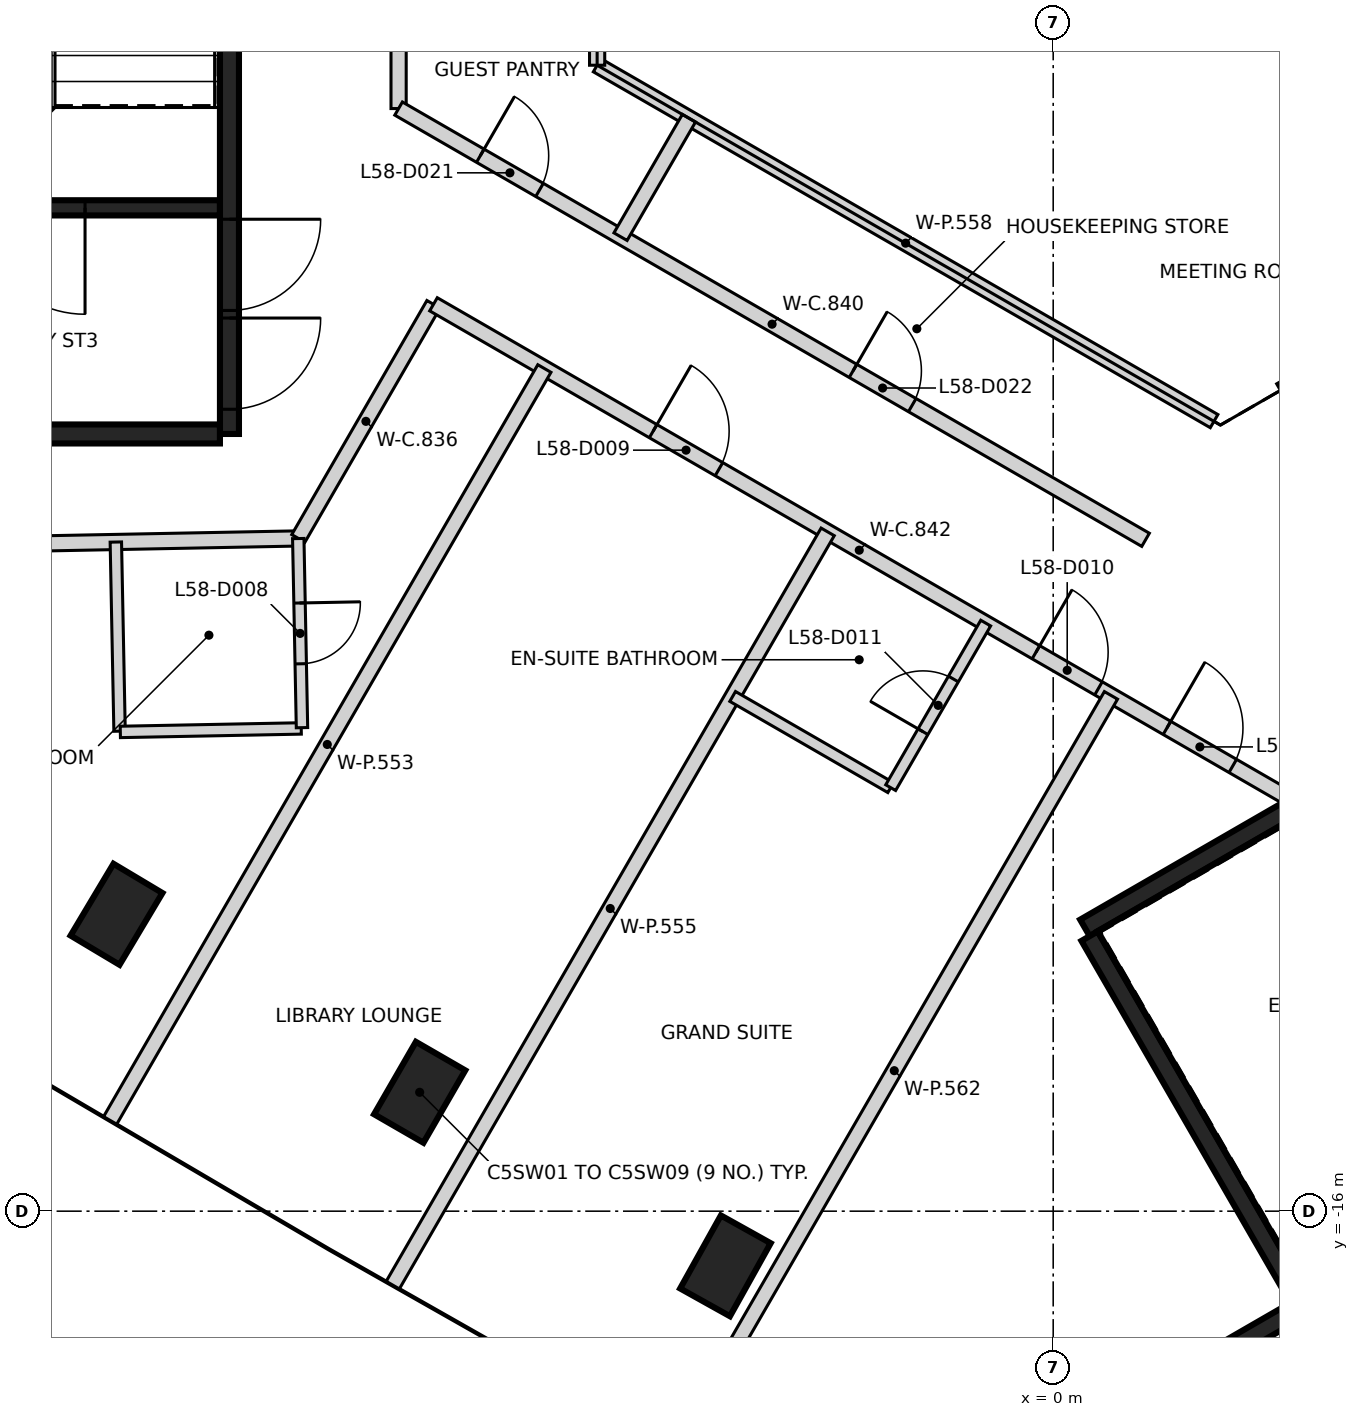
"""IFC4 building model, lengths in metres.
Left out: names, types, materials, properties, quantities, classifications, styles, units other than length and angle.
Written with IfcOpenShell. Run it as: python <this file> out.ifc"""

import sys

from ifc_helpers import new_model, si_unit, direction, frame, frame_2d, origin, origin_2d, place, context, subcontext, project, spatial, rectangle, extrude, element, fill, save


model = new_model("IFC4")
c1 = context("Model", 3, precision=1e-05, world=origin(), true_north=direction((0.0, 1.0)))
c2 = subcontext(c1, "Body", "Model", "MODEL_VIEW")
j1 = project(units=[si_unit("LENGTHUNIT", "METRE"), si_unit("PLANEANGLEUNIT", "RADIAN")], contexts=[c1])
p1 = place(None, origin())
s1 = spatial("IfcSite", under=j1, at=p1, CompositionType="ELEMENT")
p2 = place(p1, origin())
s2 = spatial("IfcBuilding", under=s1, at=p2, CompositionType="ELEMENT")
p3 = place(p2, frame((0.0, 0.0, 232.2)))
s3 = spatial("IfcBuildingStorey", under=s2, at=p3, CompositionType="ELEMENT", Elevation=232.2)
for number, where, z_axis, x_axis in (
    (1, (-12.323, -12.094, -0.35), (0.0, 0.0, 1.0), (0.513, 0.858, 0.0)),
    (2, (-8.335, -14.436, -0.35), (0.0, 0.0, 1.0), (0.5, 0.866, 0.0)),
    (3, (-4.312, -16.719, -0.35), (0.0, 0.0, 1.0), (0.487, 0.873, 0.0)),
):
    element("IfcColumn", number, at=place(p3, frame(where, z_axis=z_axis, x_axis=x_axis)), inside=s3, PredefinedType="COLUMN", context=c2, shape_type="SweptSolid", body=[
        extrude(rectangle(XDim=1.1, YDim=0.75, at=origin_2d()), origin(), (0.0, 0.0, 1.0), 3.6),
    ])
p4 = place(p3, frame((-10.837, 5.775, 0.0), z_axis=(0.0, 0.0, 1.0), x_axis=(0.0, -1.0, 0.0)))
e4 = element("IfcWall", 4, at=p4, inside=s3, PredefinedType="SHEAR", context=c2, shape_type="SweptSolid", body=[
    extrude(rectangle(XDim=11.55, YDim=0.25, at=frame_2d((5.775, 0.0))), origin(), (0.0, 0.0, 1.0), 3.25),
])
p5 = place(p4, frame((10.025, 0.0, 0.0)))
e5 = element("IfcOpeningElement", 5, at=p5, cuts=e4, PredefinedType="OPENING", context=c2, shape_type="SweptSolid", body=[
    extrude(rectangle(XDim=1.2, YDim=2.1, at=frame_2d((0.6, 1.05))), frame((0.0, 0.135, 0.0), z_axis=(0.0, -1.0, 0.0), x_axis=(1.0, 0.0, 0.0)), (0.0, 0.0, 1.0), 0.27),
])
p6 = place(p4, frame((8.725, 0.0, 0.0)))
e6 = element("IfcOpeningElement", 6, at=p6, cuts=e4, PredefinedType="OPENING", context=c2, shape_type="SweptSolid", body=[
    extrude(rectangle(XDim=1.2, YDim=2.1, at=frame_2d((0.6, 1.05))), frame((0.0, 0.135, 0.0), z_axis=(0.0, -1.0, 0.0), x_axis=(1.0, 0.0, 0.0)), (0.0, 0.0, 1.0), 0.27),
])
p7 = place(p3, frame((-10.963, -5.775, 0.0), z_axis=(0.0, 0.0, 1.0), x_axis=(-1.0, 0.0, 0.0)))
e7 = element("IfcWall", 7, at=p7, inside=s3, PredefinedType="SHEAR", context=c2, shape_type="SweptSolid", body=[
    extrude(rectangle(XDim=5.225, YDim=0.25, at=frame_2d((2.612, 0.0))), origin(), (0.0, 0.0, 1.0), 3.25),
])
p8 = place(p3, frame((-10.963, -2.8, 0.0), z_axis=(0.0, 0.0, 1.0), x_axis=(-1.0, 0.0, 0.0)))
e8 = element("IfcWall", 8, at=p8, inside=s3, PredefinedType="SHEAR", context=c2, shape_type="SweptSolid", body=[
    extrude(rectangle(XDim=5.098, YDim=0.2, at=frame_2d((2.549, 0.0))), origin(), (0.0, 0.0, 1.0), 3.25),
])
p9 = place(p8, frame((1.774, 0.0, 0.0)))
e9 = element("IfcOpeningElement", 9, at=p9, cuts=e8, PredefinedType="OPENING", context=c2, shape_type="SweptSolid", body=[
    extrude(rectangle(XDim=1.4, YDim=2.1, at=frame_2d((0.7, 1.05))), frame((0.0, 0.11, 0.0), z_axis=(0.0, -1.0, 0.0), x_axis=(1.0, 0.0, 0.0)), (0.0, 0.0, 1.0), 0.22),
])
p10 = place(p3, frame((0.417, -12.273, 0.0), z_axis=(0.0, 0.0, 1.0), x_axis=(0.866021906294, 0.500006057782, 0.0)))
e10 = element("IfcWall", 10, at=p10, inside=s3, PredefinedType="SHEAR", context=c2, shape_type="SweptSolid", body=[
    extrude(rectangle(XDim=11.55, YDim=0.25, at=frame_2d((5.775, 0.0))), origin(), (0.0, 0.0, 1.0), 3.25),
])
p11 = place(p10, frame((10.025, 0.0, 0.0)))
e11 = element("IfcOpeningElement", 11, at=p11, cuts=e10, PredefinedType="OPENING", context=c2, shape_type="SweptSolid", body=[
    extrude(rectangle(XDim=1.2, YDim=2.1, at=frame_2d((0.6, 1.05))), frame((0.0, 0.135, 0.0), z_axis=(0.0, -1.0, 0.0), x_axis=(1.0, 0.0, 0.0)), (0.0, 0.0, 1.0), 0.27),
])
p12 = place(p10, frame((8.725, 0.0, 0.0)))
e12 = element("IfcOpeningElement", 12, at=p12, cuts=e10, PredefinedType="OPENING", context=c2, shape_type="SweptSolid", body=[
    extrude(rectangle(XDim=1.2, YDim=2.1, at=frame_2d((0.6, 1.05))), frame((0.0, 0.135, 0.0), z_axis=(0.0, -1.0, 0.0), x_axis=(1.0, 0.0, 0.0)), (0.0, 0.0, 1.0), 0.27),
])
p13 = place(p3, frame((3.235, -17.153, 0.0), z_axis=(0.0, 0.0, 1.0), x_axis=(-0.500008851346, 0.866020293397, 0.0)))
e13 = element("IfcWall", 13, at=p13, inside=s3, PredefinedType="SHEAR", context=c2, shape_type="SweptSolid", body=[
    extrude(rectangle(XDim=5.51, YDim=0.25, at=frame_2d((2.755, 0.0))), origin(), (0.0, 0.0, 1.0), 3.25),
])
p14 = place(p3, frame((1.669, -18.19, 0.0), z_axis=(0.0, 0.0, 1.0), x_axis=(0.866042235819, 0.499970844928, 0.0)))
e14 = element("IfcWall", 14, at=p14, inside=s3, PredefinedType="SHEAR", context=c2, shape_type="SweptSolid", body=[
    extrude(rectangle(XDim=2.865, YDim=0.25, at=frame_2d((1.432, 0.0))), origin(), (0.0, 0.0, 1.0), 3.25),
])
p15 = place(p3, frame((-19.149, -7.329, 0.0), z_axis=(0.0, 0.0, 1.0), x_axis=(0.999810023919, 0.019491435849, 0.0)))
e15 = element("IfcWall", 15, at=p15, inside=s3, PredefinedType="PARTITIONING", context=c2, shape_type="SweptSolid", body=[
    extrude(rectangle(XDim=9.219, YDim=0.2, at=frame_2d((4.609, 0.0))), origin(), (0.0, 0.0, 1.0), 3.25),
])
p16 = place(p15, frame((3.23, 0.0, 0.0)))
e16 = element("IfcOpeningElement", 16, at=p16, cuts=e15, PredefinedType="OPENING", context=c2, shape_type="SweptSolid", body=[
    extrude(rectangle(XDim=0.95, YDim=2.1, at=frame_2d((0.475, 1.05))), frame((0.0, 0.11, 0.0), z_axis=(0.0, -1.0, 0.0), x_axis=(1.0, 0.0, 0.0)), (0.0, 0.0, 1.0), 0.22),
])
p17 = place(p3, frame((-9.931, -7.149, 0.0), z_axis=(0.0, 0.0, 1.0), x_axis=(0.499934418432, 0.86606326401, 0.0)))
e17 = element("IfcWall", 17, at=p17, inside=s3, PredefinedType="PARTITIONING", context=c2, shape_type="SweptSolid", body=[
    extrude(rectangle(XDim=3.556, YDim=0.2, at=frame_2d((1.778, 0.0))), origin(), (0.0, 0.0, 1.0), 3.25),
])
p18 = place(p3, frame((-8.612, -1.494, 0.0), z_axis=(0.0, 0.0, 1.0), x_axis=(0.0, 1.0, 0.0)))
e18 = element("IfcWall", 18, at=p18, inside=s3, PredefinedType="PARTITIONING", context=c2, shape_type="SweptSolid", body=[
    extrude(rectangle(XDim=1.383, YDim=0.2, at=frame_2d((0.691, 0.0))), origin(), (0.0, 0.0, 1.0), 3.25),
])
p19 = place(p3, frame((-8.612, -1.494, 0.0), z_axis=(0.0, 0.0, 1.0), x_axis=(0.866035468681, -0.499982566683, 0.0)))
e19 = element("IfcWall", 19, at=p19, inside=s3, PredefinedType="PARTITIONING", context=c2, shape_type="SweptSolid", body=[
    extrude(rectangle(XDim=11.348, YDim=0.2, at=frame_2d((5.674, 0.0))), origin(), (0.0, 0.0, 1.0), 3.25),
])
p20 = place(p19, frame((1.241, 0.0, 0.0)))
e20 = element("IfcOpeningElement", 20, at=p20, cuts=e19, PredefinedType="OPENING", context=c2, shape_type="SweptSolid", body=[
    extrude(rectangle(XDim=0.9, YDim=2.1, at=frame_2d((0.45, 1.05))), frame((0.0, 0.11, 0.0), z_axis=(0.0, -1.0, 0.0), x_axis=(1.0, 0.0, 0.0)), (0.0, 0.0, 1.0), 0.22),
])
p21 = place(p19, frame((6.903, 0.0, 0.0)))
e21 = element("IfcOpeningElement", 21, at=p21, cuts=e19, PredefinedType="OPENING", context=c2, shape_type="SweptSolid", body=[
    extrude(rectangle(XDim=0.9, YDim=2.1, at=frame_2d((0.45, 1.05))), frame((0.0, 0.11, 0.0), z_axis=(0.0, -1.0, 0.0), x_axis=(1.0, 0.0, 0.0)), (0.0, 0.0, 1.0), 0.22),
])
p22 = place(p3, frame((-8.153, -4.069, 0.0), z_axis=(0.0, 0.0, 1.0), x_axis=(0.865955522833, -0.500121017829, 0.0)))
e22 = element("IfcWall", 22, at=p22, inside=s3, PredefinedType="PARTITIONING", context=c2, shape_type="SweptSolid", body=[
    extrude(rectangle(XDim=12.937, YDim=0.2, at=frame_2d((6.469, 0.0))), origin(), (0.0, 0.0, 1.0), 3.25),
])
p23 = place(p22, frame((3.337, 0.0, 0.0)))
e23 = element("IfcOpeningElement", 23, at=p23, cuts=e22, PredefinedType="OPENING", context=c2, shape_type="SweptSolid", body=[
    extrude(rectangle(XDim=1.0, YDim=2.1, at=frame_2d((0.5, 1.05))), frame((0.0, 0.11, 0.0), z_axis=(0.0, -1.0, 0.0), x_axis=(1.0, 0.0, 0.0)), (0.0, 0.0, 1.0), 0.22),
])
p24 = place(p22, frame((9.153, 0.0, 0.0)))
e24 = element("IfcOpeningElement", 24, at=p24, cuts=e22, PredefinedType="OPENING", context=c2, shape_type="SweptSolid", body=[
    extrude(rectangle(XDim=0.95, YDim=2.1, at=frame_2d((0.475, 1.05))), frame((0.0, 0.11, 0.0), z_axis=(0.0, -1.0, 0.0), x_axis=(1.0, 0.0, 0.0)), (0.0, 0.0, 1.0), 0.22),
])
p25 = place(p22, frame((11.144, 0.0, 0.0)))
e25 = element("IfcOpeningElement", 25, at=p25, cuts=e22, PredefinedType="OPENING", context=c2, shape_type="SweptSolid", body=[
    extrude(rectangle(XDim=1.0, YDim=2.1, at=frame_2d((0.5, 1.05))), frame((0.0, 0.11, 0.0), z_axis=(0.0, -1.0, 0.0), x_axis=(1.0, 0.0, 0.0)), (0.0, 0.0, 1.0), 0.22),
])
p26 = place(p3, frame((-12.407, -14.806, 0.0), z_axis=(0.0, 0.0, 1.0), x_axis=(0.500104175471, 0.865965249693, 0.0)))
e26 = element("IfcWall", 26, at=p26, inside=s3, PredefinedType="PARTITIONING", context=c2, shape_type="SweptSolid", body=[
    extrude(rectangle(XDim=11.423, YDim=0.2, at=frame_2d((5.711, 0.0))), origin(), (0.0, 0.0, 1.0), 2.35),
])
p27 = place(p3, frame((-8.688, -16.973, 0.0), z_axis=(0.0, 0.0, 1.0), x_axis=(0.500021643343, 0.866012907634, 0.0)))
e27 = element("IfcWall", 27, at=p27, inside=s3, PredefinedType="PARTITIONING", context=c2, shape_type="SweptSolid", body=[
    extrude(rectangle(XDim=11.443, YDim=0.2, at=frame_2d((5.721, 0.0))), origin(), (0.0, 0.0, 1.0), 2.35),
])
p28 = place(p3, frame((-6.0, -0.924, 0.0), z_axis=(0.0, 0.0, 1.0), x_axis=(0.866223755075, -0.499656288007, 0.0)))
e28 = element("IfcWall", 28, at=p28, inside=s3, PredefinedType="PARTITIONING", context=c2, shape_type="SweptSolid", body=[
    extrude(rectangle(XDim=9.37, YDim=0.2, at=frame_2d((4.685, 0.0))), origin(), (0.0, 0.0, 1.0), 3.25),
])
p29 = place(p3, frame((-6.0, -0.924, 0.0), z_axis=(0.0, 0.0, 1.0), x_axis=(0.0, 1.0, 0.0)))
e29 = element("IfcWall", 29, at=p29, inside=s3, PredefinedType="PARTITIONING", context=c2, shape_type="SweptSolid", body=[
    extrude(rectangle(XDim=1.848, YDim=0.2, at=frame_2d((0.924, 0.0))), origin(), (0.0, 0.0, 1.0), 3.25),
])
p30 = place(p3, frame((-5.692, -3.179, 0.0), z_axis=(0.0, 0.0, 1.0), x_axis=(0.500164619231, 0.865930339964, 0.0)))
e30 = element("IfcWall", 30, at=p30, inside=s3, PredefinedType="PARTITIONING", context=c2, shape_type="SweptSolid", body=[
    extrude(rectangle(XDim=1.8, YDim=0.2, at=frame_2d((0.9, 0.0))), origin(), (0.0, 0.0, 1.0), 3.25),
])
p31 = place(p3, frame((-4.942, -19.089, 0.0), z_axis=(0.0, 0.0, 1.0), x_axis=(0.500021458202, 0.866013014531, 0.0)))
e31 = element("IfcWall", 31, at=p31, inside=s3, PredefinedType="PARTITIONING", context=c2, shape_type="SweptSolid", body=[
    extrude(rectangle(XDim=11.403, YDim=0.2, at=frame_2d((5.701, 0.0))), origin(), (0.0, 0.0, 1.0), 2.35),
])
p32 = place(p3, frame((2.99, -5.202, 0.0), z_axis=(0.0, 0.0, 1.0), x_axis=(0.865872609263, 0.500264554538, 0.0)))
e32 = element("IfcWall", 32, at=p32, inside=s3, PredefinedType="PARTITIONING", context=c2, shape_type="SweptSolid", body=[
    extrude(rectangle(XDim=0.936, YDim=0.2, at=frame_2d((0.468, 0.0))), origin(), (0.0, 0.0, 1.0), 3.25),
])
p33 = place(p3, frame((-12.332, -7.197, 0.0), z_axis=(0.0, 0.0, 1.0), x_axis=(0.019719450113, -0.999805552739, 0.0)))
e33 = element("IfcWall", 33, at=p33, inside=s3, PredefinedType="PARTITIONING", context=c2, shape_type="SweptSolid", body=[
    extrude(rectangle(XDim=2.489, YDim=0.15, at=frame_2d((1.244, 0.0))), origin(), (0.0, 0.0, 1.0), 3.25),
])
p34 = place(p3, frame((-12.273, -9.695, 0.0), z_axis=(0.0, 0.0, 1.0), x_axis=(0.999812094216, 0.019384949303, 0.0)))
e34 = element("IfcWall", 34, at=p34, inside=s3, PredefinedType="PARTITIONING", context=c2, shape_type="SweptSolid", body=[
    extrude(rectangle(XDim=2.38, YDim=0.15, at=frame_2d((1.19, 0.0))), origin(), (0.0, 0.0, 1.0), 3.25),
])
p35 = place(p3, frame((-9.932, -7.151, 0.0), z_axis=(0.0, 0.0, 1.0), x_axis=(0.019621381261, -0.999807482167, 0.0)))
e35 = element("IfcWall", 35, at=p35, inside=s3, PredefinedType="PARTITIONING", context=c2, shape_type="SweptSolid", body=[
    extrude(rectangle(XDim=2.489, YDim=0.15, at=frame_2d((1.244, 0.0))), origin(), (0.0, 0.0, 1.0), 3.25),
])
p36 = place(p35, frame((0.848, 0.0, 0.0)))
e36 = element("IfcOpeningElement", 36, at=p36, cuts=e35, PredefinedType="OPENING", context=c2, shape_type="SweptSolid", body=[
    extrude(rectangle(XDim=0.8, YDim=2.1, at=frame_2d((0.4, 1.05))), frame((0.0, 0.085, 0.0), z_axis=(0.0, -1.0, 0.0), x_axis=(1.0, 0.0, 0.0)), (0.0, 0.0, 1.0), 0.17),
])
p37 = place(p3, frame((-4.217, -9.228, 0.0), z_axis=(0.0, 0.0, 1.0), x_axis=(0.866100915363, -0.499869187296, 0.0)))
e37 = element("IfcWall", 37, at=p37, inside=s3, PredefinedType="PARTITIONING", context=c2, shape_type="SweptSolid", body=[
    extrude(rectangle(XDim=2.401, YDim=0.15, at=frame_2d((1.2, 0.0))), origin(), (0.0, 0.0, 1.0), 3.25),
])
p38 = place(p3, frame((-2.138, -10.428, 0.0), z_axis=(0.0, 0.0, 1.0), x_axis=(0.500004234368, 0.866022959057, 0.0)))
e38 = element("IfcWall", 38, at=p38, inside=s3, PredefinedType="PARTITIONING", context=c2, shape_type="SweptSolid", body=[
    extrude(rectangle(XDim=2.5, YDim=0.15, at=frame_2d((1.25, 0.0))), origin(), (0.0, 0.0, 1.0), 3.25),
])
p39 = place(p38, frame((0.85, 0.0, 0.0)))
e39 = element("IfcOpeningElement", 39, at=p39, cuts=e38, PredefinedType="OPENING", context=c2, shape_type="SweptSolid", body=[
    extrude(rectangle(XDim=0.8, YDim=2.1, at=frame_2d((0.4, 1.05))), frame((0.0, 0.085, 0.0), z_axis=(0.0, -1.0, 0.0), x_axis=(1.0, 0.0, 0.0)), (0.0, 0.0, 1.0), 0.17),
])
p40 = place(p5, origin())
e40 = element("IfcDoor", 40, at=p40, inside=s3, OperationType="SINGLE_SWING_LEFT", PredefinedType="DOOR", context=c2, shape_type="SweptSolid", body=[
    extrude(rectangle(XDim=1.2, YDim=2.1, at=frame_2d((0.6, 1.05))), frame((0.0, 0.025, 0.0), z_axis=(0.0, -1.0, 0.0), x_axis=(1.0, 0.0, 0.0)), (0.0, 0.0, 1.0), 0.05),
])
fill(e5, e40)
p41 = place(p6, origin())
e41 = element("IfcDoor", 41, at=p41, inside=s3, OperationType="SINGLE_SWING_RIGHT", PredefinedType="DOOR", context=c2, shape_type="SweptSolid", body=[
    extrude(rectangle(XDim=1.2, YDim=2.1, at=frame_2d((0.6, 1.05))), frame((0.0, 0.025, 0.0), z_axis=(0.0, -1.0, 0.0), x_axis=(1.0, 0.0, 0.0)), (0.0, 0.0, 1.0), 0.05),
])
fill(e6, e41)
p42 = place(p9, origin())
e42 = element("IfcDoor", 42, at=p42, inside=s3, OperationType="SINGLE_SWING_RIGHT", PredefinedType="DOOR", context=c2, shape_type="SweptSolid", body=[
    extrude(rectangle(XDim=1.4, YDim=2.1, at=frame_2d((0.7, 1.05))), frame((0.0, 0.025, 0.0), z_axis=(0.0, -1.0, 0.0), x_axis=(1.0, 0.0, 0.0)), (0.0, 0.0, 1.0), 0.05),
])
fill(e9, e42)
p43 = place(p36, frame((0.8, 0.0, 0.0), z_axis=(0.0, 0.0, 1.0), x_axis=(-1.0, 0.0, 0.0)))
e43 = element("IfcDoor", 43, at=p43, inside=s3, OperationType="SINGLE_SWING_LEFT", PredefinedType="DOOR", context=c2, shape_type="SweptSolid", body=[
    extrude(rectangle(XDim=0.8, YDim=2.1, at=frame_2d((0.4, 1.05))), frame((0.0, 0.025, 0.0), z_axis=(0.0, -1.0, 0.0), x_axis=(1.0, 0.0, 0.0)), (0.0, 0.0, 1.0), 0.05),
])
fill(e36, e43)
p44 = place(p23, frame((1.0, 0.0, 0.0), z_axis=(0.0, 0.0, 1.0), x_axis=(-1.0, 0.0, 0.0)))
e44 = element("IfcDoor", 44, at=p44, inside=s3, OperationType="SINGLE_SWING_LEFT", PredefinedType="DOOR", context=c2, shape_type="SweptSolid", body=[
    extrude(rectangle(XDim=1.0, YDim=2.1, at=frame_2d((0.5, 1.05))), frame((0.0, 0.025, 0.0), z_axis=(0.0, -1.0, 0.0), x_axis=(1.0, 0.0, 0.0)), (0.0, 0.0, 1.0), 0.05),
])
fill(e23, e44)
p45 = place(p24, frame((0.95, 0.0, 0.0), z_axis=(0.0, 0.0, 1.0), x_axis=(-1.0, 0.0, 0.0)))
e45 = element("IfcDoor", 45, at=p45, inside=s3, OperationType="SINGLE_SWING_LEFT", PredefinedType="DOOR", context=c2, shape_type="SweptSolid", body=[
    extrude(rectangle(XDim=0.95, YDim=2.1, at=frame_2d((0.475, 1.05))), frame((0.0, 0.025, 0.0), z_axis=(0.0, -1.0, 0.0), x_axis=(1.0, 0.0, 0.0)), (0.0, 0.0, 1.0), 0.05),
])
fill(e24, e45)
p46 = place(p39, origin())
e46 = element("IfcDoor", 46, at=p46, inside=s3, OperationType="SINGLE_SWING_LEFT", PredefinedType="DOOR", context=c2, shape_type="SweptSolid", body=[
    extrude(rectangle(XDim=0.8, YDim=2.1, at=frame_2d((0.4, 1.05))), frame((0.0, 0.025, 0.0), z_axis=(0.0, -1.0, 0.0), x_axis=(1.0, 0.0, 0.0)), (0.0, 0.0, 1.0), 0.05),
])
fill(e39, e46)
p47 = place(p25, frame((1.0, 0.0, 0.0), z_axis=(0.0, 0.0, 1.0), x_axis=(-1.0, 0.0, 0.0)))
e47 = element("IfcDoor", 47, at=p47, inside=s3, OperationType="SINGLE_SWING_LEFT", PredefinedType="DOOR", context=c2, shape_type="SweptSolid", body=[
    extrude(rectangle(XDim=1.0, YDim=2.1, at=frame_2d((0.5, 1.05))), frame((0.0, 0.025, 0.0), z_axis=(0.0, -1.0, 0.0), x_axis=(1.0, 0.0, 0.0)), (0.0, 0.0, 1.0), 0.05),
])
fill(e25, e47)
p48 = place(p20, origin())
e48 = element("IfcDoor", 48, at=p48, inside=s3, OperationType="SINGLE_SWING_LEFT", PredefinedType="DOOR", context=c2, shape_type="SweptSolid", body=[
    extrude(rectangle(XDim=0.9, YDim=2.1, at=frame_2d((0.45, 1.05))), frame((0.0, 0.025, 0.0), z_axis=(0.0, -1.0, 0.0), x_axis=(1.0, 0.0, 0.0)), (0.0, 0.0, 1.0), 0.05),
])
fill(e20, e48)
p49 = place(p21, origin())
e49 = element("IfcDoor", 49, at=p49, inside=s3, OperationType="SINGLE_SWING_LEFT", PredefinedType="DOOR", context=c2, shape_type="SweptSolid", body=[
    extrude(rectangle(XDim=0.9, YDim=2.1, at=frame_2d((0.45, 1.05))), frame((0.0, 0.025, 0.0), z_axis=(0.0, -1.0, 0.0), x_axis=(1.0, 0.0, 0.0)), (0.0, 0.0, 1.0), 0.05),
])
fill(e21, e49)
save(model, sys.argv[1])
